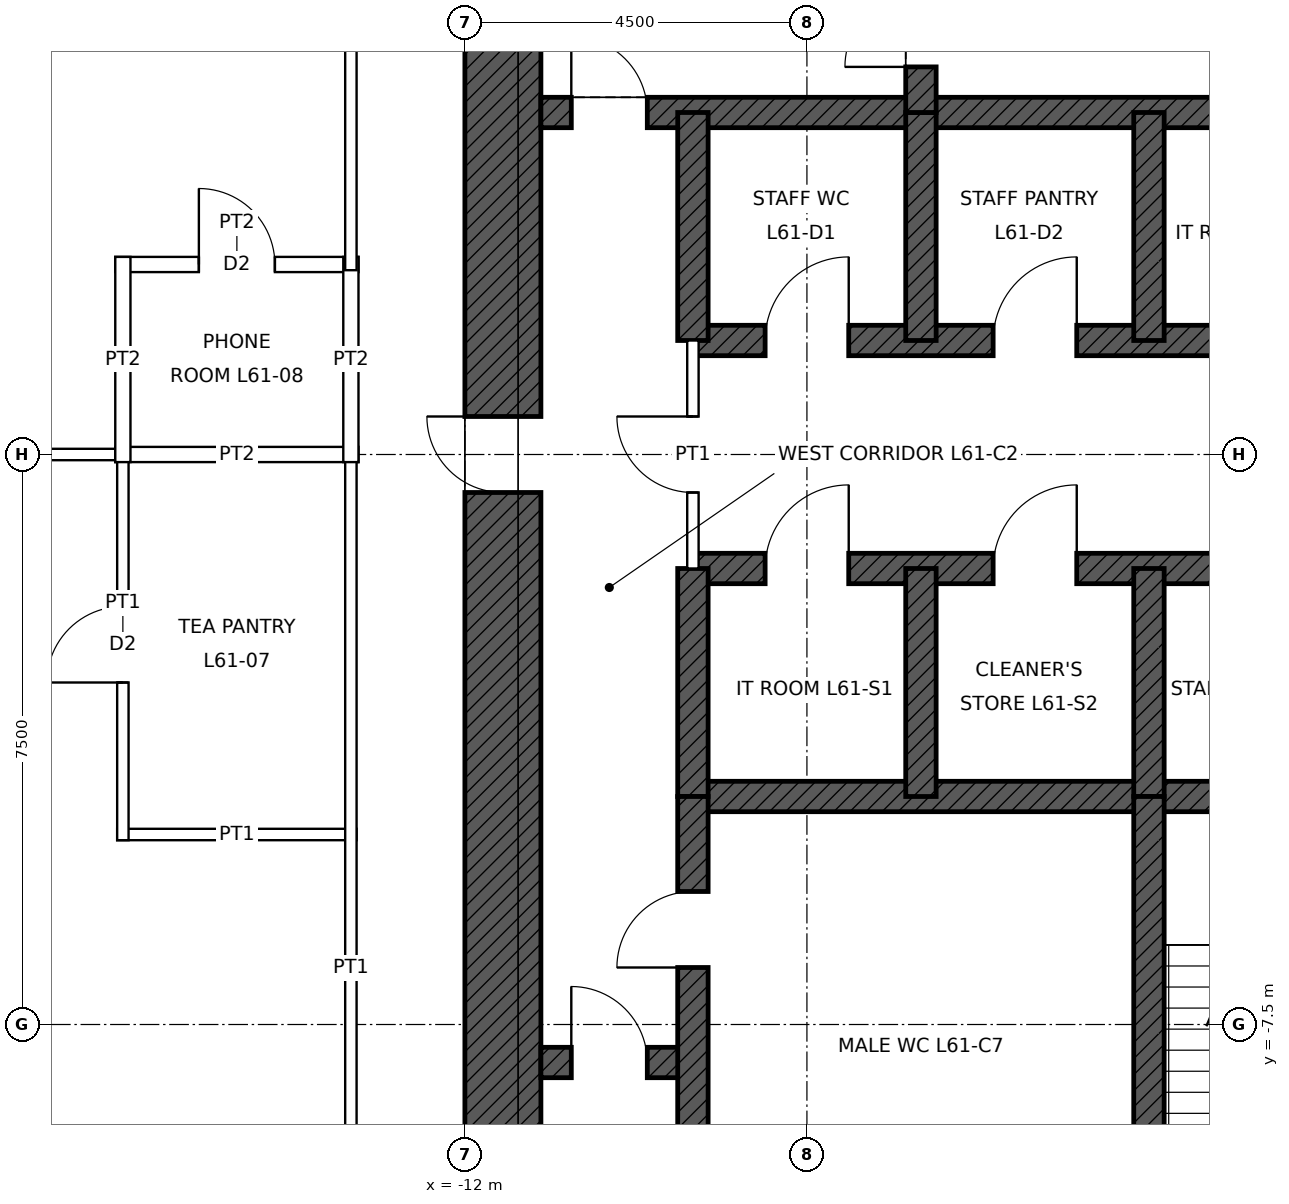
"""IFC4 building model, lengths in metres.
Left out: names, types, materials, properties, quantities, classifications, styles, units other than length and angle.
Written with IfcOpenShell. Run it as: python <this file> out.ifc"""

import sys

from ifc_helpers import new_model, si_unit, direction, frame, frame_2d, origin, place, context, subcontext, project, spatial, rectangle, extrude, element, fill, save


model = new_model("IFC4")
c1 = context("Model", 3, precision=1e-05, world=origin(), true_north=direction((0.0, 1.0)))
c2 = subcontext(c1, "Body", "Model", "MODEL_VIEW")
j1 = project(units=[si_unit("LENGTHUNIT", "METRE"), si_unit("PLANEANGLEUNIT", "RADIAN")], contexts=[c1])
p1 = place(None, origin())
s1 = spatial("IfcSite", under=j1, at=p1, CompositionType="ELEMENT")
p2 = place(p1, origin())
s2 = spatial("IfcBuilding", under=s1, at=p2, CompositionType="ELEMENT")
p3 = place(p2, frame((0.0, 0.0, 279.9)))
s3 = spatial("IfcBuildingStorey", under=s2, at=p3, CompositionType="ELEMENT", Elevation=279.9)
p4 = place(p3, frame((-11.5, -11.0, 0.0), z_axis=(0.0, 0.0, 1.0), x_axis=(0.0, 1.0, 0.0)))
e1 = element("IfcWall", 1, at=p4, inside=s3, PredefinedType="SHEAR", context=c2, shape_type="SweptSolid", body=[
    extrude(rectangle(XDim=22.0, YDim=1.0, at=frame_2d((11.0, 0.0))), origin(), (0.0, 0.0, 1.0), 4.0),
])
p5 = place(p4, frame((10.5, 0.0, 0.0)))
e2 = element("IfcOpeningElement", 2, at=p5, cuts=e1, PredefinedType="OPENING", context=c2, shape_type="SweptSolid", body=[
    extrude(rectangle(XDim=1.0, YDim=2.4, at=frame_2d((0.5, 1.2))), frame((0.0, 0.51, 0.0), z_axis=(0.0, -1.0, 0.0), x_axis=(1.0, 0.0, 0.0)), (0.0, 0.0, 1.0), 1.02),
])
p6 = place(p3, frame((-11.0, 4.5, 0.0), z_axis=(0.0, 0.0, 1.0), x_axis=(1.0, 0.0, 0.0)))
e3 = element("IfcWall", 3, at=p6, inside=s3, PredefinedType="SHEAR", context=c2, shape_type="SweptSolid", body=[
    extrude(rectangle(XDim=22.0, YDim=0.4, at=frame_2d((11.0, 0.0))), origin(), (0.0, 0.0, 1.0), 4.0),
])
p7 = place(p6, frame((0.4, 0.0, 0.0)))
e4 = element("IfcOpeningElement", 4, at=p7, cuts=e3, PredefinedType="OPENING", context=c2, shape_type="SweptSolid", body=[
    extrude(rectangle(XDim=1.0, YDim=2.1, at=frame_2d((0.5, 1.05))), frame((0.0, 0.21, 0.0), z_axis=(0.0, -1.0, 0.0), x_axis=(1.0, 0.0, 0.0)), (0.0, 0.0, 1.0), 0.42),
])
p8 = place(p6, frame((20.6, 0.0, 0.0)))
e5 = element("IfcOpeningElement", 5, at=p8, cuts=e3, PredefinedType="OPENING", context=c2, shape_type="SweptSolid", body=[
    extrude(rectangle(XDim=1.0, YDim=2.1, at=frame_2d((0.5, 1.05))), frame((0.0, 0.21, 0.0), z_axis=(0.0, -1.0, 0.0), x_axis=(1.0, 0.0, 0.0)), (0.0, 0.0, 1.0), 0.42),
])
p9 = place(p3, frame((-9.0, 1.5, 0.0), z_axis=(0.0, 0.0, 1.0), x_axis=(1.0, 0.0, 0.0)))
e6 = element("IfcWall", 6, at=p9, inside=s3, PredefinedType="SHEAR", context=c2, shape_type="SweptSolid", body=[
    extrude(rectangle(XDim=18.0, YDim=0.4, at=frame_2d((9.0, 0.0))), origin(), (0.0, 0.0, 1.0), 4.0),
])
p10 = place(p9, frame((0.95, 0.0, 0.0)))
e7 = element("IfcOpeningElement", 7, at=p10, cuts=e6, PredefinedType="OPENING", context=c2, shape_type="SweptSolid", body=[
    extrude(rectangle(XDim=1.1, YDim=2.1, at=frame_2d((0.55, 1.05))), frame((0.0, 0.21, 0.0), z_axis=(0.0, -1.0, 0.0), x_axis=(1.0, 0.0, 0.0)), (0.0, 0.0, 1.0), 0.42),
])
p11 = place(p9, frame((3.95, 0.0, 0.0)))
e8 = element("IfcOpeningElement", 8, at=p11, cuts=e6, PredefinedType="OPENING", context=c2, shape_type="SweptSolid", body=[
    extrude(rectangle(XDim=1.1, YDim=2.1, at=frame_2d((0.55, 1.05))), frame((0.0, 0.21, 0.0), z_axis=(0.0, -1.0, 0.0), x_axis=(1.0, 0.0, 0.0)), (0.0, 0.0, 1.0), 0.42),
])
p12 = place(p9, frame((6.95, 0.0, 0.0)))
e9 = element("IfcOpeningElement", 9, at=p12, cuts=e6, PredefinedType="OPENING", context=c2, shape_type="SweptSolid", body=[
    extrude(rectangle(XDim=1.1, YDim=2.1, at=frame_2d((0.55, 1.05))), frame((0.0, 0.21, 0.0), z_axis=(0.0, -1.0, 0.0), x_axis=(1.0, 0.0, 0.0)), (0.0, 0.0, 1.0), 0.42),
])
p13 = place(p9, frame((9.95, 0.0, 0.0)))
e10 = element("IfcOpeningElement", 10, at=p13, cuts=e6, PredefinedType="OPENING", context=c2, shape_type="SweptSolid", body=[
    extrude(rectangle(XDim=1.1, YDim=2.1, at=frame_2d((0.55, 1.05))), frame((0.0, 0.21, 0.0), z_axis=(0.0, -1.0, 0.0), x_axis=(1.0, 0.0, 0.0)), (0.0, 0.0, 1.0), 0.42),
])
p14 = place(p9, frame((12.95, 0.0, 0.0)))
e11 = element("IfcOpeningElement", 11, at=p14, cuts=e6, PredefinedType="OPENING", context=c2, shape_type="SweptSolid", body=[
    extrude(rectangle(XDim=1.1, YDim=2.1, at=frame_2d((0.55, 1.05))), frame((0.0, 0.21, 0.0), z_axis=(0.0, -1.0, 0.0), x_axis=(1.0, 0.0, 0.0)), (0.0, 0.0, 1.0), 0.42),
])
p15 = place(p9, frame((15.95, 0.0, 0.0)))
e12 = element("IfcOpeningElement", 12, at=p15, cuts=e6, PredefinedType="OPENING", context=c2, shape_type="SweptSolid", body=[
    extrude(rectangle(XDim=1.1, YDim=2.1, at=frame_2d((0.55, 1.05))), frame((0.0, 0.21, 0.0), z_axis=(0.0, -1.0, 0.0), x_axis=(1.0, 0.0, 0.0)), (0.0, 0.0, 1.0), 0.42),
])
p16 = place(p3, frame((-9.0, -1.5, 0.0), z_axis=(0.0, 0.0, 1.0), x_axis=(1.0, 0.0, 0.0)))
e13 = element("IfcWall", 13, at=p16, inside=s3, PredefinedType="SHEAR", context=c2, shape_type="SweptSolid", body=[
    extrude(rectangle(XDim=18.0, YDim=0.4, at=frame_2d((9.0, 0.0))), origin(), (0.0, 0.0, 1.0), 4.0),
])
p17 = place(p16, frame((9.95, 0.0, 0.0)))
e14 = element("IfcOpeningElement", 14, at=p17, cuts=e13, PredefinedType="OPENING", context=c2, shape_type="SweptSolid", body=[
    extrude(rectangle(XDim=1.1, YDim=2.1, at=frame_2d((0.55, 1.05))), frame((0.0, 0.21, 0.0), z_axis=(0.0, -1.0, 0.0), x_axis=(1.0, 0.0, 0.0)), (0.0, 0.0, 1.0), 0.42),
])
p18 = place(p16, frame((12.95, 0.0, 0.0)))
e15 = element("IfcOpeningElement", 15, at=p18, cuts=e13, PredefinedType="OPENING", context=c2, shape_type="SweptSolid", body=[
    extrude(rectangle(XDim=1.1, YDim=2.1, at=frame_2d((0.55, 1.05))), frame((0.0, 0.21, 0.0), z_axis=(0.0, -1.0, 0.0), x_axis=(1.0, 0.0, 0.0)), (0.0, 0.0, 1.0), 0.42),
])
p19 = place(p16, frame((15.95, 0.0, 0.0)))
e16 = element("IfcOpeningElement", 16, at=p19, cuts=e13, PredefinedType="OPENING", context=c2, shape_type="SweptSolid", body=[
    extrude(rectangle(XDim=1.1, YDim=2.1, at=frame_2d((0.55, 1.05))), frame((0.0, 0.21, 0.0), z_axis=(0.0, -1.0, 0.0), x_axis=(1.0, 0.0, 0.0)), (0.0, 0.0, 1.0), 0.42),
])
p20 = place(p16, frame((0.95, 0.0, 0.0)))
e17 = element("IfcOpeningElement", 17, at=p20, cuts=e13, PredefinedType="OPENING", context=c2, shape_type="SweptSolid", body=[
    extrude(rectangle(XDim=1.1, YDim=2.1, at=frame_2d((0.55, 1.05))), frame((0.0, 0.21, 0.0), z_axis=(0.0, -1.0, 0.0), x_axis=(1.0, 0.0, 0.0)), (0.0, 0.0, 1.0), 0.42),
])
p21 = place(p16, frame((3.95, 0.0, 0.0)))
e18 = element("IfcOpeningElement", 18, at=p21, cuts=e13, PredefinedType="OPENING", context=c2, shape_type="SweptSolid", body=[
    extrude(rectangle(XDim=1.1, YDim=2.1, at=frame_2d((0.55, 1.05))), frame((0.0, 0.21, 0.0), z_axis=(0.0, -1.0, 0.0), x_axis=(1.0, 0.0, 0.0)), (0.0, 0.0, 1.0), 0.42),
])
p22 = place(p16, frame((6.95, 0.0, 0.0)))
e19 = element("IfcOpeningElement", 19, at=p22, cuts=e13, PredefinedType="OPENING", context=c2, shape_type="SweptSolid", body=[
    extrude(rectangle(XDim=1.1, YDim=2.1, at=frame_2d((0.55, 1.05))), frame((0.0, 0.21, 0.0), z_axis=(0.0, -1.0, 0.0), x_axis=(1.0, 0.0, 0.0)), (0.0, 0.0, 1.0), 0.42),
])
p23 = place(p3, frame((-9.0, -4.5, 0.0), z_axis=(0.0, 0.0, 1.0), x_axis=(1.0, 0.0, 0.0)))
e20 = element("IfcWall", 20, at=p23, inside=s3, PredefinedType="SHEAR", context=c2, shape_type="SweptSolid", body=[
    extrude(rectangle(XDim=18.0, YDim=0.4, at=frame_2d((9.0, 0.0))), origin(), (0.0, 0.0, 1.0), 4.0),
])
p24 = place(p3, frame((-11.0, -8.0, 0.0), z_axis=(0.0, 0.0, 1.0), x_axis=(1.0, 0.0, 0.0)))
e21 = element("IfcWall", 21, at=p24, inside=s3, PredefinedType="SHEAR", context=c2, shape_type="SweptSolid", body=[
    extrude(rectangle(XDim=2.0, YDim=0.4, at=frame_2d((1.0, 0.0))), origin(), (0.0, 0.0, 1.0), 4.0),
])
p25 = place(p24, frame((0.4, 0.0, 0.0)))
e22 = element("IfcOpeningElement", 22, at=p25, cuts=e21, PredefinedType="OPENING", context=c2, shape_type="SweptSolid", body=[
    extrude(rectangle(XDim=1.0, YDim=2.1, at=frame_2d((0.5, 1.05))), frame((0.0, 0.21, 0.0), z_axis=(0.0, -1.0, 0.0), x_axis=(1.0, 0.0, 0.0)), (0.0, 0.0, 1.0), 0.42),
])
for number, where, z_axis, x_axis in (
    (23, (-9.0, 1.5, 0.0), (0.0, 0.0, 1.0), (0.0, 1.0, 0.0)),
    (24, (-9.0, -4.5, 0.0), (0.0, 0.0, 1.0), (0.0, 1.0, 0.0)),
    (25, (-6.0, 1.5, 0.0), (0.0, 0.0, 1.0), (0.0, 1.0, 0.0)),
    (26, (-3.0, 1.5, 0.0), (0.0, 0.0, 1.0), (0.0, 1.0, 0.0)),
    (27, (-6.0, -4.5, 0.0), (0.0, 0.0, 1.0), (0.0, 1.0, 0.0)),
    (28, (-3.0, -4.5, 0.0), (0.0, 0.0, 1.0), (0.0, 1.0, 0.0)),
):
    element("IfcWall", number, at=place(p3, frame(where, z_axis=z_axis, x_axis=x_axis)), inside=s3, PredefinedType="SHEAR", context=c2, shape_type="SweptSolid", body=[
        extrude(rectangle(XDim=3.0, YDim=0.4, at=frame_2d((1.5, 0.0))), origin(), (0.0, 0.0, 1.0), 4.0),
    ])
p26 = place(p3, frame((-6.0, 4.5, 0.0), z_axis=(0.0, 0.0, 1.0), x_axis=(0.0, 1.0, 0.0)))
e29 = element("IfcWall", 29, at=p26, inside=s3, PredefinedType="SHEAR", context=c2, shape_type="SweptSolid", body=[
    extrude(rectangle(XDim=6.5, YDim=0.4, at=frame_2d((3.25, 0.0))), origin(), (0.0, 0.0, 1.0), 4.0),
])
p27 = place(p26, frame((0.6, 0.0, 0.0)))
e30 = element("IfcOpeningElement", 30, at=p27, cuts=e29, PredefinedType="OPENING", context=c2, shape_type="SweptSolid", body=[
    extrude(rectangle(XDim=1.0, YDim=2.1, at=frame_2d((0.5, 1.05))), frame((0.0, 0.21, 0.0), z_axis=(0.0, -1.0, 0.0), x_axis=(1.0, 0.0, 0.0)), (0.0, 0.0, 1.0), 0.42),
])
p28 = place(p3, frame((-9.0, -11.0, 0.0), z_axis=(0.0, 0.0, 1.0), x_axis=(0.0, 1.0, 0.0)))
e31 = element("IfcWall", 31, at=p28, inside=s3, PredefinedType="SHEAR", context=c2, shape_type="SweptSolid", body=[
    extrude(rectangle(XDim=6.5, YDim=0.4, at=frame_2d((3.25, 0.0))), origin(), (0.0, 0.0, 1.0), 4.0),
])
p29 = place(p28, frame((4.25, 0.0, 0.0)))
e32 = element("IfcOpeningElement", 32, at=p29, cuts=e31, PredefinedType="OPENING", context=c2, shape_type="SweptSolid", body=[
    extrude(rectangle(XDim=1.0, YDim=2.1, at=frame_2d((0.5, 1.05))), frame((0.0, 0.21, 0.0), z_axis=(0.0, -1.0, 0.0), x_axis=(1.0, 0.0, 0.0)), (0.0, 0.0, 1.0), 0.42),
])
p30 = place(p3, frame((-3.0, -11.0, 0.0), z_axis=(0.0, 0.0, 1.0), x_axis=(0.0, 1.0, 0.0)))
e33 = element("IfcWall", 33, at=p30, inside=s3, PredefinedType="SHEAR", context=c2, shape_type="SweptSolid", body=[
    extrude(rectangle(XDim=6.5, YDim=0.4, at=frame_2d((3.25, 0.0))), origin(), (0.0, 0.0, 1.0), 4.0),
])
p31 = place(p3, frame((-16.575, -5.0, 0.0), z_axis=(0.0, 0.0, 1.0), x_axis=(1.0, 0.0, 0.0)))
e34 = element("IfcWall", 34, at=p31, inside=s3, PredefinedType="PARTITIONING", context=c2, shape_type="SweptSolid", body=[
    extrude(rectangle(XDim=3.15, YDim=0.15, at=frame_2d((1.575, 0.0))), origin(), (0.0, 0.0, 1.0), 3.85),
])
p32 = place(p3, frame((-19.54, 0.0, 0.0), z_axis=(0.0, 0.0, 1.0), x_axis=(1.0, 0.0, 0.0)))
e35 = element("IfcWall", 35, at=p32, inside=s3, PredefinedType="PARTITIONING", context=c2, shape_type="SweptSolid", body=[
    extrude(rectangle(XDim=3.115, YDim=0.15, at=frame_2d((1.558, 0.0))), origin(), (0.0, 0.0, 1.0), 3.243),
])
p33 = place(p3, frame((-16.6, 0.0, 0.0), z_axis=(0.0, 0.0, 1.0), x_axis=(1.0, 0.0, 0.0)))
e36 = element("IfcWall", 36, at=p33, inside=s3, PredefinedType="PARTITIONING", context=c2, shape_type="SweptSolid", body=[
    extrude(rectangle(XDim=3.2, YDim=0.2, at=frame_2d((1.6, 0.0))), origin(), (0.0, 0.0, 1.0), 3.243),
])
p34 = place(p3, frame((-16.6, 2.5, 0.0), z_axis=(0.0, 0.0, 1.0), x_axis=(1.0, 0.0, 0.0)))
e37 = element("IfcWall", 37, at=p34, inside=s3, PredefinedType="PARTITIONING", context=c2, shape_type="SweptSolid", body=[
    extrude(rectangle(XDim=3.2, YDim=0.2, at=frame_2d((1.6, 0.0))), origin(), (0.0, 0.0, 1.0), 3.85),
])
p35 = place(p34, frame((1.1, 0.0, 0.0)))
e38 = element("IfcOpeningElement", 38, at=p35, cuts=e37, PredefinedType="OPENING", context=c2, shape_type="SweptSolid", body=[
    extrude(rectangle(XDim=1.0, YDim=2.1, at=frame_2d((0.5, 1.05))), frame((0.0, 0.11, 0.0), z_axis=(0.0, -1.0, 0.0), x_axis=(1.0, 0.0, 0.0)), (0.0, 0.0, 1.0), 0.22),
])
p36 = place(p3, frame((-16.5, -5.075, 0.0), z_axis=(0.0, 0.0, 1.0), x_axis=(0.0, 1.0, 0.0)))
e39 = element("IfcWall", 39, at=p36, inside=s3, PredefinedType="PARTITIONING", context=c2, shape_type="SweptSolid", body=[
    extrude(rectangle(XDim=5.15, YDim=0.15, at=frame_2d((2.575, 0.0))), origin(), (0.0, 0.0, 1.0), 3.85),
])
p37 = place(p36, frame((2.075, 0.0, 0.0)))
e40 = element("IfcOpeningElement", 40, at=p37, cuts=e39, PredefinedType="OPENING", context=c2, shape_type="SweptSolid", body=[
    extrude(rectangle(XDim=1.0, YDim=2.1, at=frame_2d((0.5, 1.05))), frame((0.0, 0.085, 0.0), z_axis=(0.0, -1.0, 0.0), x_axis=(1.0, 0.0, 0.0)), (0.0, 0.0, 1.0), 0.17),
])
p38 = place(p3, frame((-16.5, -0.1, 0.0), z_axis=(0.0, 0.0, 1.0), x_axis=(0.0, 1.0, 0.0)))
e41 = element("IfcWall", 41, at=p38, inside=s3, PredefinedType="PARTITIONING", context=c2, shape_type="SweptSolid", body=[
    extrude(rectangle(XDim=2.7, YDim=0.2, at=frame_2d((1.35, 0.0))), origin(), (0.0, 0.0, 1.0), 3.85),
])
p39 = place(p3, frame((-13.5, -13.575, 0.0), z_axis=(0.0, 0.0, 1.0), x_axis=(0.0, 1.0, 0.0)))
e42 = element("IfcWall", 42, at=p39, inside=s3, PredefinedType="PARTITIONING", context=c2, shape_type="SweptSolid", body=[
    extrude(rectangle(XDim=13.65, YDim=0.15, at=frame_2d((6.825, 0.0))), origin(), (0.0, 0.0, 1.0), 3.85),
])
p40 = place(p3, frame((-13.5, -0.1, 0.0), z_axis=(0.0, 0.0, 1.0), x_axis=(0.0, 1.0, 0.0)))
e43 = element("IfcWall", 43, at=p40, inside=s3, PredefinedType="PARTITIONING", context=c2, shape_type="SweptSolid", body=[
    extrude(rectangle(XDim=2.7, YDim=0.2, at=frame_2d((1.35, 0.0))), origin(), (0.0, 0.0, 1.0), 3.85),
])
p41 = place(p3, frame((-13.5, 2.425, 0.0), z_axis=(0.0, 0.0, 1.0), x_axis=(0.0, 1.0, 0.0)))
e44 = element("IfcWall", 44, at=p41, inside=s3, PredefinedType="PARTITIONING", context=c2, shape_type="SweptSolid", body=[
    extrude(rectangle(XDim=11.15, YDim=0.15, at=frame_2d((5.575, 0.0))), origin(), (0.0, 0.0, 1.0), 3.85),
])
p42 = place(p41, frame((5.075, 0.0, 0.0)))
e45 = element("IfcOpeningElement", 45, at=p42, cuts=e44, PredefinedType="OPENING", context=c2, shape_type="SweptSolid", body=[
    extrude(rectangle(XDim=1.0, YDim=2.4, at=frame_2d((0.5, 1.2))), frame((0.0, 0.085, 0.0), z_axis=(0.0, -1.0, 0.0), x_axis=(1.0, 0.0, 0.0)), (0.0, 0.0, 1.0), 0.17),
])
p43 = place(p3, frame((-9.0, -1.5, 0.0), z_axis=(0.0, 0.0, 1.0), x_axis=(0.0, 1.0, 0.0)))
e46 = element("IfcWall", 46, at=p43, inside=s3, PredefinedType="PARTITIONING", context=c2, shape_type="SweptSolid", body=[
    extrude(rectangle(XDim=3.0, YDim=0.15, at=frame_2d((1.5, 0.0))), origin(), (0.0, 0.0, 1.0), 3.75),
])
p44 = place(p43, frame((1.0, 0.0, 0.0)))
e47 = element("IfcOpeningElement", 47, at=p44, cuts=e46, PredefinedType="OPENING", context=c2, shape_type="SweptSolid", body=[
    extrude(rectangle(XDim=1.0, YDim=2.4, at=frame_2d((0.5, 1.2))), frame((0.0, 0.085, 0.0), z_axis=(0.0, -1.0, 0.0), x_axis=(1.0, 0.0, 0.0)), (0.0, 0.0, 1.0), 0.17),
])
p45 = place(p7, origin())
e48 = element("IfcDoor", 48, at=p45, inside=s3, OperationType="SINGLE_SWING_LEFT", PredefinedType="DOOR", context=c2, shape_type="SweptSolid", body=[
    extrude(rectangle(XDim=1.0, YDim=2.1, at=frame_2d((0.5, 1.05))), frame((0.0, 0.025, 0.0), z_axis=(0.0, -1.0, 0.0), x_axis=(1.0, 0.0, 0.0)), (0.0, 0.0, 1.0), 0.05),
])
fill(e4, e48)
p46 = place(p27, origin())
e49 = element("IfcDoor", 49, at=p46, inside=s3, OperationType="SINGLE_SWING_LEFT", PredefinedType="DOOR", context=c2, shape_type="SweptSolid", body=[
    extrude(rectangle(XDim=1.0, YDim=2.1, at=frame_2d((0.5, 1.05))), frame((0.0, 0.025, 0.0), z_axis=(0.0, -1.0, 0.0), x_axis=(1.0, 0.0, 0.0)), (0.0, 0.0, 1.0), 0.05),
])
fill(e30, e49)
p47 = place(p5, origin())
e50 = element("IfcDoor", 50, at=p47, inside=s3, OperationType="SINGLE_SWING_RIGHT", PredefinedType="DOOR", context=c2, shape_type="SweptSolid", body=[
    extrude(rectangle(XDim=1.0, YDim=2.4, at=frame_2d((0.5, 1.2))), frame((0.0, 0.485, 0.0), z_axis=(0.0, -1.0, 0.0), x_axis=(1.0, 0.0, 0.0)), (0.0, 0.0, 1.0), 0.05),
])
fill(e2, e50)
p48 = place(p29, origin())
e51 = element("IfcDoor", 51, at=p48, inside=s3, OperationType="SINGLE_SWING_LEFT", PredefinedType="DOOR", context=c2, shape_type="SweptSolid", body=[
    extrude(rectangle(XDim=1.0, YDim=2.1, at=frame_2d((0.5, 1.05))), frame((0.0, 0.025, 0.0), z_axis=(0.0, -1.0, 0.0), x_axis=(1.0, 0.0, 0.0)), (0.0, 0.0, 1.0), 0.05),
])
fill(e32, e51)
p49 = place(p25, origin())
e52 = element("IfcDoor", 52, at=p49, inside=s3, OperationType="SINGLE_SWING_LEFT", PredefinedType="DOOR", context=c2, shape_type="SweptSolid", body=[
    extrude(rectangle(XDim=1.0, YDim=2.1, at=frame_2d((0.5, 1.05))), frame((0.0, 0.025, 0.0), z_axis=(0.0, -1.0, 0.0), x_axis=(1.0, 0.0, 0.0)), (0.0, 0.0, 1.0), 0.05),
])
fill(e22, e52)
p50 = place(p44, origin())
e53 = element("IfcDoor", 53, at=p50, inside=s3, OperationType="SINGLE_SWING_RIGHT", PredefinedType="DOOR", context=c2, shape_type="SweptSolid", body=[
    extrude(rectangle(XDim=1.0, YDim=2.4, at=frame_2d((0.5, 1.2))), frame((0.0, 0.025, 0.0), z_axis=(0.0, -1.0, 0.0), x_axis=(1.0, 0.0, 0.0)), (0.0, 0.0, 1.0), 0.05),
])
fill(e47, e53)
p51 = place(p10, origin())
e54 = element("IfcDoor", 54, at=p51, inside=s3, OperationType="SINGLE_SWING_RIGHT", PredefinedType="DOOR", context=c2, shape_type="SweptSolid", body=[
    extrude(rectangle(XDim=1.1, YDim=2.1, at=frame_2d((0.55, 1.05))), frame((0.0, 0.025, 0.0), z_axis=(0.0, -1.0, 0.0), x_axis=(1.0, 0.0, 0.0)), (0.0, 0.0, 1.0), 0.05),
])
fill(e7, e54)
p52 = place(p11, origin())
e55 = element("IfcDoor", 55, at=p52, inside=s3, OperationType="SINGLE_SWING_RIGHT", PredefinedType="DOOR", context=c2, shape_type="SweptSolid", body=[
    extrude(rectangle(XDim=1.1, YDim=2.1, at=frame_2d((0.55, 1.05))), frame((0.0, 0.025, 0.0), z_axis=(0.0, -1.0, 0.0), x_axis=(1.0, 0.0, 0.0)), (0.0, 0.0, 1.0), 0.05),
])
fill(e8, e55)
p53 = place(p20, origin())
e56 = element("IfcDoor", 56, at=p53, inside=s3, OperationType="SINGLE_SWING_RIGHT", PredefinedType="DOOR", context=c2, shape_type="SweptSolid", body=[
    extrude(rectangle(XDim=1.1, YDim=2.1, at=frame_2d((0.55, 1.05))), frame((0.0, 0.025, 0.0), z_axis=(0.0, -1.0, 0.0), x_axis=(1.0, 0.0, 0.0)), (0.0, 0.0, 1.0), 0.05),
])
fill(e17, e56)
p54 = place(p21, origin())
e57 = element("IfcDoor", 57, at=p54, inside=s3, OperationType="SINGLE_SWING_RIGHT", PredefinedType="DOOR", context=c2, shape_type="SweptSolid", body=[
    extrude(rectangle(XDim=1.1, YDim=2.1, at=frame_2d((0.55, 1.05))), frame((0.0, 0.025, 0.0), z_axis=(0.0, -1.0, 0.0), x_axis=(1.0, 0.0, 0.0)), (0.0, 0.0, 1.0), 0.05),
])
fill(e18, e57)
p55 = place(p37, origin())
e58 = element("IfcDoor", 58, at=p55, inside=s3, OperationType="SINGLE_SWING_LEFT", PredefinedType="DOOR", context=c2, shape_type="SweptSolid", body=[
    extrude(rectangle(XDim=1.0, YDim=2.1, at=frame_2d((0.5, 1.05))), frame((0.0, 0.025, 0.0), z_axis=(0.0, -1.0, 0.0), x_axis=(1.0, 0.0, 0.0)), (0.0, 0.0, 1.0), 0.05),
])
fill(e40, e58)
p56 = place(p35, origin())
e59 = element("IfcDoor", 59, at=p56, inside=s3, OperationType="SINGLE_SWING_LEFT", PredefinedType="DOOR", context=c2, shape_type="SweptSolid", body=[
    extrude(rectangle(XDim=1.0, YDim=2.1, at=frame_2d((0.5, 1.05))), frame((0.0, 0.025, 0.0), z_axis=(0.0, -1.0, 0.0), x_axis=(1.0, 0.0, 0.0)), (0.0, 0.0, 1.0), 0.05),
])
fill(e38, e59)
save(model, sys.argv[1])
